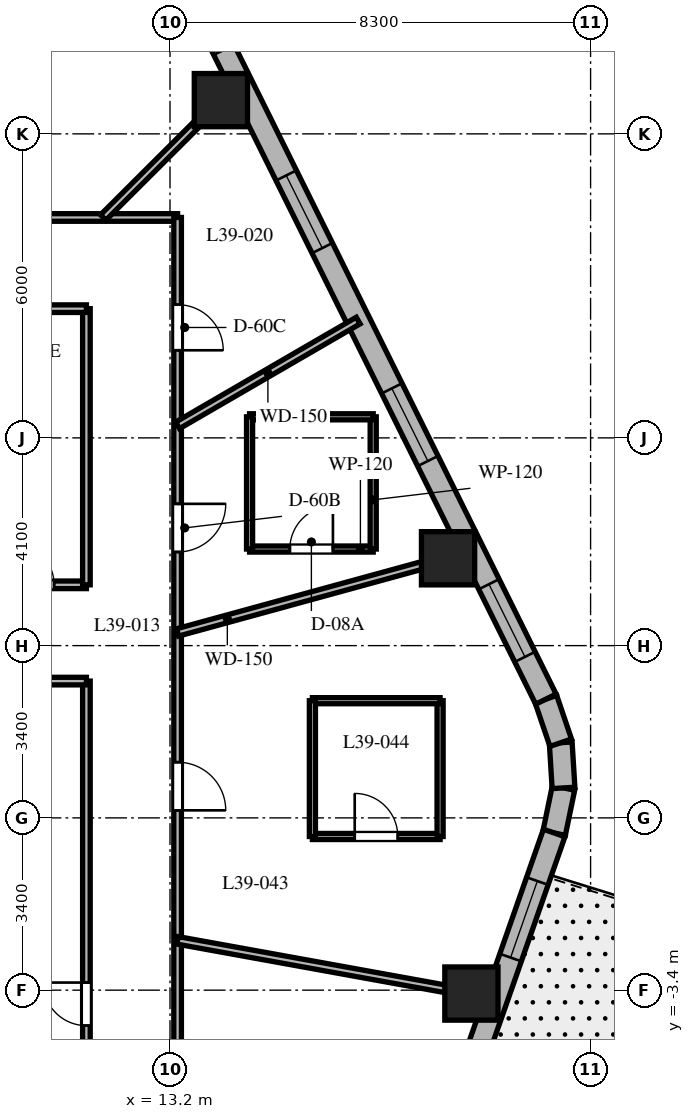
"""IFC4 building model, lengths in metres.
Left out: names, types, materials, properties, quantities, classifications, styles, units other than length and angle.
Written with IfcOpenShell. Run it as: python <this file> out.ifc"""

import sys

from ifc_helpers import new_model, si_unit, direction, frame, frame_2d, origin, origin_2d, place, context, subcontext, project, spatial, rectangle, extrude, element, fill, save


model = new_model("IFC4")
c1 = context("Model", 3, precision=1e-05, world=origin(), true_north=direction((0.0, 1.0)))
c2 = subcontext(c1, "Body", "Model", "MODEL_VIEW")
j1 = project(units=[si_unit("LENGTHUNIT", "METRE"), si_unit("PLANEANGLEUNIT", "RADIAN")], contexts=[c1])
p1 = place(None, origin())
s1 = spatial("IfcSite", under=j1, at=p1, CompositionType="ELEMENT")
p2 = place(p1, origin())
s2 = spatial("IfcBuilding", under=s1, at=p2, CompositionType="ELEMENT")
p3 = place(p2, frame((0.0, 0.0, 159.1)))
s3 = spatial("IfcBuildingStorey", under=s2, at=p3, CompositionType="ELEMENT", Elevation=159.1)
for number, where, z_axis, x_axis in (
    (1, (19.148, -3.467, 0.0), (0.0, 0.0, 1.0), (1.0, 0.0, 0.0)),
    (2, (18.687, 5.124, 0.0), (0.0, 0.0, 1.0), (1.0, 0.0, 0.0)),
    (3, (14.204, 14.166, 0.0), (0.0, 0.0, 1.0), (1.0, 0.0, 0.0)),
):
    element("IfcColumn", number, at=place(p3, frame(where, z_axis=z_axis, x_axis=x_axis)), inside=s3, PredefinedType="COLUMN", context=c2, shape_type="SweptSolid", body=[
        extrude(rectangle(XDim=1.05, YDim=1.05, at=origin_2d()), origin(), (0.0, 0.0, 1.0), 3.7),
    ])
p4 = place(p3, frame((20.782, -0.298, 0.0), z_axis=(0.0, 0.0, 1.0), x_axis=(0.202570068411, 0.979267771033, 0.0)))
e4 = element("IfcWall", 4, at=p4, inside=s3, PredefinedType="SOLIDWALL", context=c2, shape_type="SweptSolid", body=[
    extrude(rectangle(XDim=0.909, YDim=0.45, at=frame_2d((0.454, 0.0))), origin(), (0.0, 0.0, 1.0), 3.4),
])
p5 = place(p3, frame((20.966, 0.592, 0.0), z_axis=(0.0, 0.0, 1.0), x_axis=(-0.061748898935, 0.998091715966, 0.0)))
e5 = element("IfcWall", 5, at=p5, inside=s3, PredefinedType="SOLIDWALL", context=c2, shape_type="SweptSolid", body=[
    extrude(rectangle(XDim=0.894, YDim=0.45, at=frame_2d((0.447, 0.0))), origin(), (0.0, 0.0, 1.0), 3.4),
])
p6 = place(p3, frame((20.911, 1.484, 0.0), z_axis=(0.0, 0.0, 1.0), x_axis=(-0.321623334353, 0.946867694453, 0.0)))
e6 = element("IfcWall", 6, at=p6, inside=s3, PredefinedType="SOLIDWALL", context=c2, shape_type="SweptSolid", body=[
    extrude(rectangle(XDim=0.909, YDim=0.45, at=frame_2d((0.454, 0.0))), origin(), (0.0, 0.0, 1.0), 3.4),
])
p7 = place(p3, frame((14.937, -16.993, 0.0), z_axis=(0.0, 0.0, 1.0), x_axis=(0.330431575061, 0.943829949834, 0.0)))
e7 = element("IfcWall", 7, at=p7, inside=s3, PredefinedType="SOLIDWALL", context=c2, shape_type="SweptSolid", body=[
    extrude(rectangle(XDim=17.689, YDim=0.45, at=frame_2d((8.844, 0.0))), origin(), (0.0, 0.0, 1.0), 3.4),
])
p8 = place(p7, frame((4.807, 0.0, 0.0)))
e8 = element("IfcOpeningElement", 8, at=p8, cuts=e7, PredefinedType="OPENING", context=c2, shape_type="SweptSolid", body=[
    extrude(rectangle(XDim=0.95, YDim=2.15, at=frame_2d((0.475, 1.075))), frame((0.0, 0.235, 0.0), z_axis=(0.0, -1.0, 0.0), x_axis=(1.0, 0.0, 0.0)), (0.0, 0.0, 1.0), 0.47),
])
p9 = place(p7, frame((0.95, 0.0, 0.8)))
e9 = element("IfcOpeningElement", 9, at=p9, cuts=e7, PredefinedType="OPENING", context=c2, shape_type="SweptSolid", body=[
    extrude(rectangle(XDim=1.6, YDim=1.75, at=frame_2d((0.8, 0.875))), frame((0.0, 0.235, 0.0), z_axis=(0.0, -1.0, 0.0), x_axis=(1.0, 0.0, 0.0)), (0.0, 0.0, 1.0), 0.47),
])
p10 = place(p7, frame((7.99, 0.0, 0.8)))
e10 = element("IfcOpeningElement", 10, at=p10, cuts=e7, PredefinedType="OPENING", context=c2, shape_type="SweptSolid", body=[
    extrude(rectangle(XDim=1.6, YDim=1.75, at=frame_2d((0.8, 0.875))), frame((0.0, 0.235, 0.0), z_axis=(0.0, -1.0, 0.0), x_axis=(1.0, 0.0, 0.0)), (0.0, 0.0, 1.0), 0.47),
])
p11 = place(p7, frame((15.084, 0.0, 0.8)))
e11 = element("IfcOpeningElement", 11, at=p11, cuts=e7, PredefinedType="OPENING", context=c2, shape_type="SweptSolid", body=[
    extrude(rectangle(XDim=1.6, YDim=1.75, at=frame_2d((0.8, 0.875))), frame((0.0, 0.235, 0.0), z_axis=(0.0, -1.0, 0.0), x_axis=(1.0, 0.0, 0.0)), (0.0, 0.0, 1.0), 0.47),
])
p12 = place(p3, frame((20.618, 2.344, 0.0), z_axis=(0.0, 0.0, 1.0), x_axis=(-0.444243691097, 0.895905990002, 0.0)))
e12 = element("IfcWall", 12, at=p12, inside=s3, PredefinedType="SOLIDWALL", context=c2, shape_type="SweptSolid", body=[
    extrude(rectangle(XDim=16.784, YDim=0.45, at=frame_2d((8.392, 0.0))), origin(), (0.0, 0.0, 1.0), 3.4),
])
p13 = place(p12, frame((5.245, 0.0, 0.8)))
e13 = element("IfcOpeningElement", 13, at=p13, cuts=e12, PredefinedType="OPENING", context=c2, shape_type="SweptSolid", body=[
    extrude(rectangle(XDim=1.6, YDim=1.75, at=frame_2d((0.8, 0.875))), frame((0.0, 0.235, 0.0), z_axis=(0.0, -1.0, 0.0), x_axis=(1.0, 0.0, 0.0)), (0.0, 0.0, 1.0), 0.47),
])
p14 = place(p12, frame((9.936, 0.0, 0.8)))
e14 = element("IfcOpeningElement", 14, at=p14, cuts=e12, PredefinedType="OPENING", context=c2, shape_type="SweptSolid", body=[
    extrude(rectangle(XDim=1.6, YDim=1.75, at=frame_2d((0.8, 0.875))), frame((0.0, 0.235, 0.0), z_axis=(0.0, -1.0, 0.0), x_axis=(1.0, 0.0, 0.0)), (0.0, 0.0, 1.0), 0.47),
])
p15 = place(p12, frame((14.303, 0.0, 0.8)))
e15 = element("IfcOpeningElement", 15, at=p15, cuts=e12, PredefinedType="OPENING", context=c2, shape_type="SweptSolid", body=[
    extrude(rectangle(XDim=1.6, YDim=1.75, at=frame_2d((0.8, 0.875))), frame((0.0, 0.235, 0.0), z_axis=(0.0, -1.0, 0.0), x_axis=(1.0, 0.0, 0.0)), (0.0, 0.0, 1.0), 0.47),
])
p16 = place(p12, frame((0.931, 0.0, 0.8)))
e16 = element("IfcOpeningElement", 16, at=p16, cuts=e12, PredefinedType="OPENING", context=c2, shape_type="SweptSolid", body=[
    extrude(rectangle(XDim=1.6, YDim=1.75, at=frame_2d((0.8, 0.875))), frame((0.0, 0.235, 0.0), z_axis=(0.0, -1.0, 0.0), x_axis=(1.0, 0.0, 0.0)), (0.0, 0.0, 1.0), 0.47),
])
p17 = place(p3, frame((-13.35, 11.85, 0.0), z_axis=(0.0, 0.0, 1.0), x_axis=(1.0, 0.0, 0.0)))
e17 = element("IfcWall", 17, at=p17, inside=s3, PredefinedType="PARTITIONING", context=c2, shape_type="SweptSolid", body=[
    extrude(rectangle(XDim=26.7, YDim=0.15, at=frame_2d((13.35, 0.0))), origin(), (0.0, 0.0, 1.0), 2.84),
])
p18 = place(p17, frame((20.682, 0.0, 0.0)))
e18 = element("IfcOpeningElement", 18, at=p18, cuts=e17, PredefinedType="OPENING", context=c2, shape_type="SweptSolid", body=[
    extrude(rectangle(XDim=0.95, YDim=2.03, at=frame_2d((0.475, 1.015))), frame((0.0, 0.085, 0.0), z_axis=(0.0, -1.0, 0.0), x_axis=(1.0, 0.0, 0.0)), (0.0, 0.0, 1.0), 0.17),
])
p19 = place(p17, frame((14.708, 0.0, 0.0)))
e19 = element("IfcOpeningElement", 19, at=p19, cuts=e17, PredefinedType="OPENING", context=c2, shape_type="SweptSolid", body=[
    extrude(rectangle(XDim=0.95, YDim=2.03, at=frame_2d((0.475, 1.015))), frame((0.0, 0.085, 0.0), z_axis=(0.0, -1.0, 0.0), x_axis=(1.0, 0.0, 0.0)), (0.0, 0.0, 1.0), 0.17),
])
p20 = place(p17, frame((10.553, 0.0, 0.0)))
e20 = element("IfcOpeningElement", 20, at=p20, cuts=e17, PredefinedType="OPENING", context=c2, shape_type="SweptSolid", body=[
    extrude(rectangle(XDim=0.95, YDim=2.03, at=frame_2d((0.475, 1.015))), frame((0.0, 0.085, 0.0), z_axis=(0.0, -1.0, 0.0), x_axis=(1.0, 0.0, 0.0)), (0.0, 0.0, 1.0), 0.17),
])
p21 = place(p17, frame((3.995, 0.0, 0.0)))
e21 = element("IfcOpeningElement", 21, at=p21, cuts=e17, PredefinedType="OPENING", context=c2, shape_type="SweptSolid", body=[
    extrude(rectangle(XDim=0.95, YDim=2.03, at=frame_2d((0.475, 1.015))), frame((0.0, 0.085, 0.0), z_axis=(0.0, -1.0, 0.0), x_axis=(1.0, 0.0, 0.0)), (0.0, 0.0, 1.0), 0.17),
])
p22 = place(p3, frame((13.35, 11.85, 0.0), z_axis=(0.0, 0.0, 1.0), x_axis=(0.0, -1.0, 0.0)))
e22 = element("IfcWall", 22, at=p22, inside=s3, PredefinedType="PARTITIONING", context=c2, shape_type="SweptSolid", body=[
    extrude(rectangle(XDim=23.7, YDim=0.15, at=frame_2d((11.85, 0.0))), origin(), (0.0, 0.0, 1.0), 2.84),
])
p23 = place(p22, frame((5.652, 0.0, 0.0)))
e23 = element("IfcOpeningElement", 23, at=p23, cuts=e22, PredefinedType="OPENING", context=c2, shape_type="SweptSolid", body=[
    extrude(rectangle(XDim=0.95, YDim=2.03, at=frame_2d((0.475, 1.015))), frame((0.0, 0.085, 0.0), z_axis=(0.0, -1.0, 0.0), x_axis=(1.0, 0.0, 0.0)), (0.0, 0.0, 1.0), 0.17),
])
p24 = place(p22, frame((1.721, 0.0, 0.0)))
e24 = element("IfcOpeningElement", 24, at=p24, cuts=e22, PredefinedType="OPENING", context=c2, shape_type="SweptSolid", body=[
    extrude(rectangle(XDim=0.9, YDim=2.03, at=frame_2d((0.45, 1.015))), frame((0.0, 0.085, 0.0), z_axis=(0.0, -1.0, 0.0), x_axis=(1.0, 0.0, 0.0)), (0.0, 0.0, 1.0), 0.17),
])
p25 = place(p22, frame((18.389, 0.0, 0.0)))
e25 = element("IfcOpeningElement", 25, at=p25, cuts=e22, PredefinedType="OPENING", context=c2, shape_type="SweptSolid", body=[
    extrude(rectangle(XDim=0.95, YDim=2.03, at=frame_2d((0.475, 1.015))), frame((0.0, 0.085, 0.0), z_axis=(0.0, -1.0, 0.0), x_axis=(1.0, 0.0, 0.0)), (0.0, 0.0, 1.0), 0.17),
])
p26 = place(p22, frame((10.751, 0.0, 0.0)))
e26 = element("IfcOpeningElement", 26, at=p26, cuts=e22, PredefinedType="OPENING", context=c2, shape_type="SweptSolid", body=[
    extrude(rectangle(XDim=0.95, YDim=2.03, at=frame_2d((0.475, 1.015))), frame((0.0, 0.085, 0.0), z_axis=(0.0, -1.0, 0.0), x_axis=(1.0, 0.0, 0.0)), (0.0, 0.0, 1.0), 0.17),
])
p27 = place(p3, frame((11.55, -10.05, 0.0), z_axis=(0.0, 0.0, 1.0), x_axis=(0.0, 1.0, 0.0)))
e27 = element("IfcWall", 27, at=p27, inside=s3, PredefinedType="PARTITIONING", context=c2, shape_type="SweptSolid", body=[
    extrude(rectangle(XDim=12.75, YDim=0.15, at=frame_2d((6.375, 0.0))), origin(), (0.0, 0.0, 1.0), 2.84),
])
p28 = place(p27, frame((5.95, 0.0, 0.0)))
e28 = element("IfcOpeningElement", 28, at=p28, cuts=e27, PredefinedType="OPENING", context=c2, shape_type="SweptSolid", body=[
    extrude(rectangle(XDim=0.85, YDim=2.03, at=frame_2d((0.425, 1.015))), frame((0.0, 0.085, 0.0), z_axis=(0.0, -1.0, 0.0), x_axis=(1.0, 0.0, 0.0)), (0.0, 0.0, 1.0), 0.17),
])
p29 = place(p3, frame((11.55, 2.7, 0.0), z_axis=(0.0, 0.0, 1.0), x_axis=(-1.0, 0.0, 0.0)))
e29 = element("IfcWall", 29, at=p29, inside=s3, PredefinedType="PARTITIONING", context=c2, shape_type="SweptSolid", body=[
    extrude(rectangle(XDim=2.125, YDim=0.15, at=frame_2d((1.062, 0.0))), origin(), (0.0, 0.0, 1.0), 3.4),
])
p30 = place(p3, frame((9.425, 4.6, 0.0), z_axis=(0.0, 0.0, 1.0), x_axis=(1.0, 0.0, 0.0)))
e30 = element("IfcWall", 30, at=p30, inside=s3, PredefinedType="PARTITIONING", context=c2, shape_type="SweptSolid", body=[
    extrude(rectangle(XDim=2.125, YDim=0.15, at=frame_2d((1.062, 0.0))), origin(), (0.0, 0.0, 1.0), 3.4),
])
p31 = place(p30, frame((0.637, 0.0, 0.0)))
e31 = element("IfcOpeningElement", 31, at=p31, cuts=e30, PredefinedType="OPENING", context=c2, shape_type="SweptSolid", body=[
    extrude(rectangle(XDim=0.85, YDim=2.03, at=frame_2d((0.425, 1.015))), frame((0.0, 0.085, 0.0), z_axis=(0.0, -1.0, 0.0), x_axis=(1.0, 0.0, 0.0)), (0.0, 0.0, 1.0), 0.17),
])
p32 = place(p3, frame((11.55, 4.6, 0.0), z_axis=(0.0, 0.0, 1.0), x_axis=(0.0, 1.0, 0.0)))
e32 = element("IfcWall", 32, at=p32, inside=s3, PredefinedType="PARTITIONING", context=c2, shape_type="SweptSolid", body=[
    extrude(rectangle(XDim=5.45, YDim=0.15, at=frame_2d((2.725, 0.0))), origin(), (0.0, 0.0, 1.0), 2.84),
])
p33 = place(p3, frame((11.55, 10.05, 0.0), z_axis=(0.0, 0.0, 1.0), x_axis=(-1.0, 0.0, 0.0)))
e33 = element("IfcWall", 33, at=p33, inside=s3, PredefinedType="PARTITIONING", context=c2, shape_type="SweptSolid", body=[
    extrude(rectangle(XDim=9.65, YDim=0.15, at=frame_2d((4.825, 0.0))), origin(), (0.0, 0.0, 1.0), 2.84),
])
p34 = place(p3, frame((13.35, 3.661, 0.0), z_axis=(0.0, 0.0, 1.0), x_axis=(0.964397145454, 0.264458211898, 0.0)))
e34 = element("IfcWall", 34, at=p34, inside=s3, PredefinedType="PARTITIONING", context=c2, shape_type="SweptSolid", body=[
    extrude(rectangle(XDim=6.039, YDim=0.15, at=frame_2d((3.019, 0.0))), origin(), (0.0, 0.0, 1.0), 2.64),
])
p35 = place(p3, frame((13.35, 7.748, 0.0), z_axis=(0.0, 0.0, 1.0), x_axis=(0.864894342526, 0.501953958313, 0.0)))
e35 = element("IfcWall", 35, at=p35, inside=s3, PredefinedType="PARTITIONING", context=c2, shape_type="SweptSolid", body=[
    extrude(rectangle(XDim=4.12, YDim=0.15, at=frame_2d((2.06, 0.0))), origin(), (0.0, 0.0, 1.0), 2.64),
])
p36 = place(p3, frame((11.882, 11.85, 0.0), z_axis=(0.0, 0.0, 1.0), x_axis=(0.708037373639, 0.706174962407, 0.0)))
e36 = element("IfcWall", 36, at=p36, inside=s3, PredefinedType="PARTITIONING", context=c2, shape_type="SweptSolid", body=[
    extrude(rectangle(XDim=3.802, YDim=0.15, at=frame_2d((1.901, 0.0))), origin(), (0.0, 0.0, 1.0), 2.64),
])
p37 = place(p3, frame((13.35, -2.417, 0.0), z_axis=(0.0, 0.0, 1.0), x_axis=(0.98399796473, -0.178179699761, 0.0)))
e37 = element("IfcWall", 37, at=p37, inside=s3, PredefinedType="PARTITIONING", context=c2, shape_type="SweptSolid", body=[
    extrude(rectangle(XDim=6.393, YDim=0.15, at=frame_2d((3.197, 0.0))), origin(), (0.0, 0.0, 1.0), 2.64),
])
p38 = place(p3, frame((14.77, 5.306, 0.0), z_axis=(0.0, 0.0, 1.0), x_axis=(1.0, 0.0, 0.0)))
e38 = element("IfcWall", 38, at=p38, inside=s3, PredefinedType="PARTITIONING", context=c2, shape_type="SweptSolid", body=[
    extrude(rectangle(XDim=2.44, YDim=0.12, at=frame_2d((1.22, 0.0))), origin(), (0.0, 0.0, 1.0), 2.84),
])
p39 = place(p38, frame((0.795, 0.0, 0.0)))
e39 = element("IfcOpeningElement", 39, at=p39, cuts=e38, PredefinedType="OPENING", context=c2, shape_type="SweptSolid", body=[
    extrude(rectangle(XDim=0.85, YDim=2.03, at=frame_2d((0.425, 1.015))), frame((0.0, 0.07, 0.0), z_axis=(0.0, -1.0, 0.0), x_axis=(1.0, 0.0, 0.0)), (0.0, 0.0, 1.0), 0.14),
])
p40 = place(p3, frame((17.21, 5.306, 0.0), z_axis=(0.0, 0.0, 1.0), x_axis=(0.0, 1.0, 0.0)))
e40 = element("IfcWall", 40, at=p40, inside=s3, PredefinedType="PARTITIONING", context=c2, shape_type="SweptSolid", body=[
    extrude(rectangle(XDim=2.61, YDim=0.12, at=frame_2d((1.305, 0.0))), origin(), (0.0, 0.0, 1.0), 2.64),
])
p41 = place(p3, frame((17.21, 7.916, 0.0), z_axis=(0.0, 0.0, 1.0), x_axis=(-1.0, 0.0, 0.0)))
e41 = element("IfcWall", 41, at=p41, inside=s3, PredefinedType="PARTITIONING", context=c2, shape_type="SweptSolid", body=[
    extrude(rectangle(XDim=2.44, YDim=0.12, at=frame_2d((1.22, 0.0))), origin(), (0.0, 0.0, 1.0), 2.64),
])
p42 = place(p3, frame((14.77, 7.916, 0.0), z_axis=(0.0, 0.0, 1.0), x_axis=(0.0, -1.0, 0.0)))
e42 = element("IfcWall", 42, at=p42, inside=s3, PredefinedType="PARTITIONING", context=c2, shape_type="SweptSolid", body=[
    extrude(rectangle(XDim=2.61, YDim=0.12, at=frame_2d((1.305, 0.0))), origin(), (0.0, 0.0, 1.0), 2.84),
])
p43 = place(p3, frame((16.01, -0.367, 0.0), z_axis=(0.0, 0.0, 1.0), x_axis=(1.0, 0.0, 0.0)))
e43 = element("IfcWall", 43, at=p43, inside=s3, PredefinedType="PARTITIONING", context=c2, shape_type="SweptSolid", body=[
    extrude(rectangle(XDim=2.52, YDim=0.12, at=frame_2d((1.26, 0.0))), origin(), (0.0, 0.0, 1.0), 3.4),
])
p44 = place(p43, frame((0.835, 0.0, 0.0)))
e44 = element("IfcOpeningElement", 44, at=p44, cuts=e43, PredefinedType="OPENING", context=c2, shape_type="SweptSolid", body=[
    extrude(rectangle(XDim=0.85, YDim=2.03, at=frame_2d((0.425, 1.015))), frame((0.0, 0.07, 0.0), z_axis=(0.0, -1.0, 0.0), x_axis=(1.0, 0.0, 0.0)), (0.0, 0.0, 1.0), 0.14),
])
p45 = place(p3, frame((18.53, -0.367, 0.0), z_axis=(0.0, 0.0, 1.0), x_axis=(0.0, 1.0, 0.0)))
e45 = element("IfcWall", 45, at=p45, inside=s3, PredefinedType="PARTITIONING", context=c2, shape_type="SweptSolid", body=[
    extrude(rectangle(XDim=2.68, YDim=0.12, at=frame_2d((1.34, 0.0))), origin(), (0.0, 0.0, 1.0), 2.64),
])
p46 = place(p3, frame((18.53, 2.313, 0.0), z_axis=(0.0, 0.0, 1.0), x_axis=(-1.0, 0.0, 0.0)))
e46 = element("IfcWall", 46, at=p46, inside=s3, PredefinedType="PARTITIONING", context=c2, shape_type="SweptSolid", body=[
    extrude(rectangle(XDim=2.52, YDim=0.12, at=frame_2d((1.26, 0.0))), origin(), (0.0, 0.0, 1.0), 3.4),
])
p47 = place(p3, frame((16.01, 2.313, 0.0), z_axis=(0.0, 0.0, 1.0), x_axis=(0.0, -1.0, 0.0)))
e47 = element("IfcWall", 47, at=p47, inside=s3, PredefinedType="PARTITIONING", context=c2, shape_type="SweptSolid", body=[
    extrude(rectangle(XDim=2.68, YDim=0.12, at=frame_2d((1.34, 0.0))), origin(), (0.0, 0.0, 1.0), 3.4),
])
p48 = place(p11, origin())
e48 = element("IfcWindow", 48, at=p48, inside=s3, PartitioningType="SINGLE_PANEL", PredefinedType="WINDOW", context=c2, shape_type="SweptSolid", body=[
    extrude(rectangle(XDim=1.6, YDim=1.75, at=frame_2d((0.8, 0.875))), frame((0.0, 0.03, 0.0), z_axis=(0.0, -1.0, 0.0), x_axis=(1.0, 0.0, 0.0)), (0.0, 0.0, 1.0), 0.06),
])
fill(e11, e48)
p49 = place(p13, origin())
e49 = element("IfcWindow", 49, at=p49, inside=s3, PartitioningType="SINGLE_PANEL", PredefinedType="WINDOW", context=c2, shape_type="SweptSolid", body=[
    extrude(rectangle(XDim=1.6, YDim=1.75, at=frame_2d((0.8, 0.875))), frame((0.0, 0.03, 0.0), z_axis=(0.0, -1.0, 0.0), x_axis=(1.0, 0.0, 0.0)), (0.0, 0.0, 1.0), 0.06),
])
fill(e13, e49)
p50 = place(p14, origin())
e50 = element("IfcWindow", 50, at=p50, inside=s3, PartitioningType="SINGLE_PANEL", PredefinedType="WINDOW", context=c2, shape_type="SweptSolid", body=[
    extrude(rectangle(XDim=1.6, YDim=1.75, at=frame_2d((0.8, 0.875))), frame((0.0, 0.03, 0.0), z_axis=(0.0, -1.0, 0.0), x_axis=(1.0, 0.0, 0.0)), (0.0, 0.0, 1.0), 0.06),
])
fill(e14, e50)
p51 = place(p16, origin())
e51 = element("IfcWindow", 51, at=p51, inside=s3, PartitioningType="SINGLE_PANEL", PredefinedType="WINDOW", context=c2, shape_type="SweptSolid", body=[
    extrude(rectangle(XDim=1.6, YDim=1.75, at=frame_2d((0.8, 0.875))), frame((0.0, 0.03, 0.0), z_axis=(0.0, -1.0, 0.0), x_axis=(1.0, 0.0, 0.0)), (0.0, 0.0, 1.0), 0.06),
])
fill(e16, e51)
p52 = place(p31, origin())
e52 = element("IfcDoor", 52, at=p52, inside=s3, OperationType="SINGLE_SWING_LEFT", PredefinedType="DOOR", context=c2, shape_type="SweptSolid", body=[
    extrude(rectangle(XDim=0.85, YDim=2.03, at=frame_2d((0.425, 1.015))), frame((0.0, 0.025, 0.0), z_axis=(0.0, -1.0, 0.0), x_axis=(1.0, 0.0, 0.0)), (0.0, 0.0, 1.0), 0.05),
])
fill(e31, e52)
p53 = place(p28, origin())
e53 = element("IfcDoor", 53, at=p53, inside=s3, OperationType="SINGLE_SWING_RIGHT", PredefinedType="DOOR", context=c2, shape_type="SweptSolid", body=[
    extrude(rectangle(XDim=0.85, YDim=2.03, at=frame_2d((0.425, 1.015))), frame((0.0, 0.025, 0.0), z_axis=(0.0, -1.0, 0.0), x_axis=(1.0, 0.0, 0.0)), (0.0, 0.0, 1.0), 0.05),
])
fill(e28, e53)
p54 = place(p23, origin())
e54 = element("IfcDoor", 54, at=p54, inside=s3, OperationType="SINGLE_SWING_LEFT", PredefinedType="DOOR", context=c2, shape_type="SweptSolid", body=[
    extrude(rectangle(XDim=0.95, YDim=2.03, at=frame_2d((0.475, 1.015))), frame((0.0, 0.025, 0.0), z_axis=(0.0, -1.0, 0.0), x_axis=(1.0, 0.0, 0.0)), (0.0, 0.0, 1.0), 0.05),
])
fill(e23, e54)
p55 = place(p39, origin())
e55 = element("IfcDoor", 55, at=p55, inside=s3, OperationType="SINGLE_SWING_RIGHT", PredefinedType="DOOR", context=c2, shape_type="SweptSolid", body=[
    extrude(rectangle(XDim=0.85, YDim=2.03, at=frame_2d((0.425, 1.015))), frame((0.0, 0.025, 0.0), z_axis=(0.0, -1.0, 0.0), x_axis=(1.0, 0.0, 0.0)), (0.0, 0.0, 1.0), 0.05),
])
fill(e39, e55)
p56 = place(p24, origin())
e56 = element("IfcDoor", 56, at=p56, inside=s3, OperationType="SINGLE_SWING_RIGHT", PredefinedType="DOOR", context=c2, shape_type="SweptSolid", body=[
    extrude(rectangle(XDim=0.9, YDim=2.03, at=frame_2d((0.45, 1.015))), frame((0.0, 0.025, 0.0), z_axis=(0.0, -1.0, 0.0), x_axis=(1.0, 0.0, 0.0)), (0.0, 0.0, 1.0), 0.05),
])
fill(e24, e56)
p57 = place(p26, origin())
e57 = element("IfcDoor", 57, at=p57, inside=s3, OperationType="SINGLE_SWING_RIGHT", PredefinedType="DOOR", context=c2, shape_type="SweptSolid", body=[
    extrude(rectangle(XDim=0.95, YDim=2.03, at=frame_2d((0.475, 1.015))), frame((0.0, 0.025, 0.0), z_axis=(0.0, -1.0, 0.0), x_axis=(1.0, 0.0, 0.0)), (0.0, 0.0, 1.0), 0.05),
])
fill(e26, e57)
p58 = place(p44, origin())
e58 = element("IfcDoor", 58, at=p58, inside=s3, OperationType="SINGLE_SWING_LEFT", PredefinedType="DOOR", context=c2, shape_type="SweptSolid", body=[
    extrude(rectangle(XDim=0.85, YDim=2.03, at=frame_2d((0.425, 1.015))), frame((0.0, 0.025, 0.0), z_axis=(0.0, -1.0, 0.0), x_axis=(1.0, 0.0, 0.0)), (0.0, 0.0, 1.0), 0.05),
])
fill(e44, e58)
save(model, sys.argv[1])
